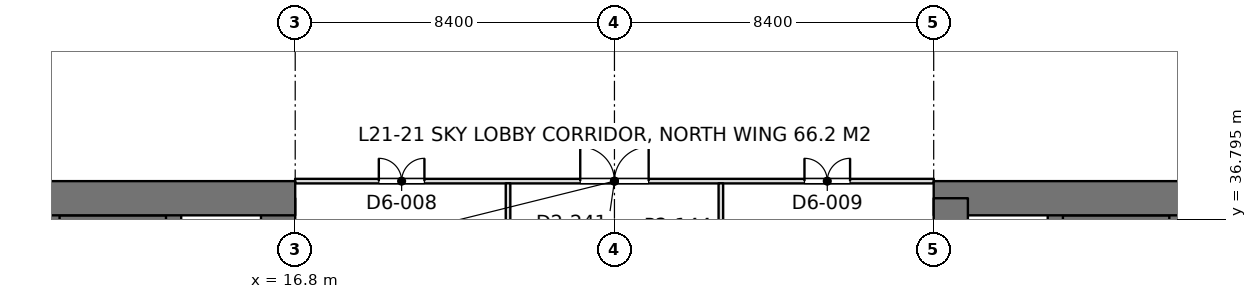
"""IFC4 building model, lengths in metres.
Left out: names, types, materials, properties, quantities, classifications, styles, units other than length and angle.
Written with IfcOpenShell. Run it as: python <this file> out.ifc"""

import sys

from ifc_helpers import new_model, si_unit, direction, frame, frame_2d, origin, place, context, subcontext, project, spatial, rectangle, extrude, element, fill, save


model = new_model("IFC4")
c1 = context("Model", 3, precision=1e-05, world=origin(), true_north=direction((0.0, 1.0)))
c2 = subcontext(c1, "Body", "Model", "MODEL_VIEW")
j1 = project(units=[si_unit("LENGTHUNIT", "METRE"), si_unit("PLANEANGLEUNIT", "RADIAN")], contexts=[c1])
p1 = place(None, origin())
s1 = spatial("IfcSite", under=j1, at=p1, CompositionType="ELEMENT")
p2 = place(p1, origin())
s2 = spatial("IfcBuilding", under=s1, at=p2, CompositionType="ELEMENT")
p3 = place(p2, frame((0.0, 0.0, 96.3)))
s3 = spatial("IfcBuildingStorey", under=s2, at=p3, CompositionType="ELEMENT", Elevation=96.3)
p4 = place(p3, frame((-1.2, 37.35, 0.0), z_axis=(0.0, 0.0, 1.0), x_axis=(1.0, 0.0, 0.0)))
e1 = element("IfcWall", 1, at=p4, inside=s3, PredefinedType="SHEAR", context=c2, shape_type="SweptSolid", body=[
    extrude(rectangle(XDim=18.0, YDim=0.9, at=frame_2d((9.0, 0.0))), origin(), (0.0, 0.0, 1.0), 4.5),
])
p5 = place(p4, frame((8.95, 0.0, 0.0)))
e2 = element("IfcOpeningElement", 2, at=p5, cuts=e1, PredefinedType="OPENING", context=c2, shape_type="SweptSolid", body=[
    extrude(rectangle(XDim=1.8, YDim=2.4, at=frame_2d((0.9, 1.2))), frame((0.0, 0.46, 0.0), z_axis=(0.0, -1.0, 0.0), x_axis=(1.0, 0.0, 0.0)), (0.0, 0.0, 1.0), 0.92),
])
p6 = place(p3, frame((16.35, 22.1, 0.0), z_axis=(0.0, 0.0, 1.0), x_axis=(0.0, 1.0, 0.0)))
e3 = element("IfcWall", 3, at=p6, inside=s3, PredefinedType="SHEAR", context=c2, shape_type="SweptSolid", body=[
    extrude(rectangle(XDim=15.25, YDim=0.9, at=frame_2d((7.625, 0.0))), origin(), (0.0, 0.0, 1.0), 4.5),
])
p7 = place(p3, frame((10.4, 13.05, 0.0), z_axis=(0.0, 0.0, 1.0), x_axis=(0.0, 1.0, 0.0)))
e4 = element("IfcWall", 4, at=p7, inside=s3, PredefinedType="SHEAR", context=c2, shape_type="SweptSolid", body=[
    extrude(rectangle(XDim=24.3, YDim=0.4, at=frame_2d((12.15, 0.0))), origin(), (0.0, 0.0, 1.0), 4.5),
])
p8 = place(p7, frame((10.05, 0.0, 0.0)))
e5 = element("IfcOpeningElement", 5, at=p8, cuts=e4, PredefinedType="OPENING", context=c2, shape_type="SweptSolid", body=[
    extrude(rectangle(XDim=1.1, YDim=2.2, at=frame_2d((0.55, 1.1))), frame((0.0, 0.21, 0.0), z_axis=(0.0, -1.0, 0.0), x_axis=(1.0, 0.0, 0.0)), (0.0, 0.0, 1.0), 0.42),
])
p9 = place(p7, frame((12.9, 0.0, 0.0)))
e6 = element("IfcOpeningElement", 6, at=p9, cuts=e4, PredefinedType="OPENING", context=c2, shape_type="SweptSolid", body=[
    extrude(rectangle(XDim=1.1, YDim=2.2, at=frame_2d((0.55, 1.1))), frame((0.0, 0.21, 0.0), z_axis=(0.0, -1.0, 0.0), x_axis=(1.0, 0.0, 0.0)), (0.0, 0.0, 1.0), 0.42),
])
p10 = place(p7, frame((21.45, 0.0, 0.0)))
e7 = element("IfcOpeningElement", 7, at=p10, cuts=e4, PredefinedType="OPENING", context=c2, shape_type="SweptSolid", body=[
    extrude(rectangle(XDim=1.1, YDim=2.2, at=frame_2d((0.55, 1.1))), frame((0.0, 0.21, 0.0), z_axis=(0.0, -1.0, 0.0), x_axis=(1.0, 0.0, 0.0)), (0.0, 0.0, 1.0), 0.42),
])
p11 = place(p7, frame((6.1, 0.0, 0.0)))
e8 = element("IfcOpeningElement", 8, at=p11, cuts=e4, PredefinedType="OPENING", context=c2, shape_type="SweptSolid", body=[
    extrude(rectangle(XDim=1.8, YDim=2.4, at=frame_2d((0.9, 1.2))), frame((0.0, 0.21, 0.0), z_axis=(0.0, -1.0, 0.0), x_axis=(1.0, 0.0, 0.0)), (0.0, 0.0, 1.0), 0.42),
])
p12 = place(p3, frame((13.6, 22.225, 0.0), z_axis=(0.0, 0.0, 1.0), x_axis=(0.0, 1.0, 0.0)))
e9 = element("IfcWall", 9, at=p12, inside=s3, PredefinedType="SHEAR", context=c2, shape_type="SweptSolid", body=[
    extrude(rectangle(XDim=15.125, YDim=0.4, at=frame_2d((7.562, 0.0))), origin(), (0.0, 0.0, 1.0), 4.5),
])
p13 = place(p3, frame((10.4, 36.625, 0.0), z_axis=(0.0, 0.0, 1.0), x_axis=(1.0, 0.0, 0.0)))
e10 = element("IfcWall", 10, at=p13, inside=s3, PredefinedType="SHEAR", context=c2, shape_type="SweptSolid", body=[
    extrude(rectangle(XDim=3.2, YDim=0.55, at=frame_2d((1.6, 0.0))), origin(), (0.0, 0.0, 1.0), 4.5),
])
p14 = place(p3, frame((33.6, 37.35, 0.0), z_axis=(0.0, 0.0, 1.0), x_axis=(1.0, 0.0, 0.0)))
e11 = element("IfcWall", 11, at=p14, inside=s3, PredefinedType="SHEAR", context=c2, shape_type="SweptSolid", body=[
    extrude(rectangle(XDim=18.0, YDim=0.9, at=frame_2d((9.0, 0.0))), origin(), (0.0, 0.0, 1.0), 4.5),
])
p15 = place(p14, frame((7.25, 0.0, 0.0)))
e12 = element("IfcOpeningElement", 12, at=p15, cuts=e11, PredefinedType="OPENING", context=c2, shape_type="SweptSolid", body=[
    extrude(rectangle(XDim=1.8, YDim=2.4, at=frame_2d((0.9, 1.2))), frame((0.0, 0.46, 0.0), z_axis=(0.0, -1.0, 0.0), x_axis=(1.0, 0.0, 0.0)), (0.0, 0.0, 1.0), 0.92),
])
p16 = place(p3, frame((34.05, 22.1, 0.0), z_axis=(0.0, 0.0, 1.0), x_axis=(0.0, 1.0, 0.0)))
e13 = element("IfcWall", 13, at=p16, inside=s3, PredefinedType="SHEAR", context=c2, shape_type="SweptSolid", body=[
    extrude(rectangle(XDim=15.25, YDim=0.9, at=frame_2d((7.625, 0.0))), origin(), (0.0, 0.0, 1.0), 4.5),
])
p17 = place(p3, frame((40.0, 13.05, 0.0), z_axis=(0.0, 0.0, 1.0), x_axis=(0.0, 1.0, 0.0)))
e14 = element("IfcWall", 14, at=p17, inside=s3, PredefinedType="SHEAR", context=c2, shape_type="SweptSolid", body=[
    extrude(rectangle(XDim=24.3, YDim=0.4, at=frame_2d((12.15, 0.0))), origin(), (0.0, 0.0, 1.0), 4.5),
])
p18 = place(p17, frame((10.05, 0.0, 0.0)))
e15 = element("IfcOpeningElement", 15, at=p18, cuts=e14, PredefinedType="OPENING", context=c2, shape_type="SweptSolid", body=[
    extrude(rectangle(XDim=1.1, YDim=2.2, at=frame_2d((0.55, 1.1))), frame((0.0, 0.21, 0.0), z_axis=(0.0, -1.0, 0.0), x_axis=(1.0, 0.0, 0.0)), (0.0, 0.0, 1.0), 0.42),
])
p19 = place(p17, frame((12.9, 0.0, 0.0)))
e16 = element("IfcOpeningElement", 16, at=p19, cuts=e14, PredefinedType="OPENING", context=c2, shape_type="SweptSolid", body=[
    extrude(rectangle(XDim=1.1, YDim=2.2, at=frame_2d((0.55, 1.1))), frame((0.0, 0.21, 0.0), z_axis=(0.0, -1.0, 0.0), x_axis=(1.0, 0.0, 0.0)), (0.0, 0.0, 1.0), 0.42),
])
p20 = place(p17, frame((21.45, 0.0, 0.0)))
e17 = element("IfcOpeningElement", 17, at=p20, cuts=e14, PredefinedType="OPENING", context=c2, shape_type="SweptSolid", body=[
    extrude(rectangle(XDim=1.1, YDim=2.2, at=frame_2d((0.55, 1.1))), frame((0.0, 0.21, 0.0), z_axis=(0.0, -1.0, 0.0), x_axis=(1.0, 0.0, 0.0)), (0.0, 0.0, 1.0), 0.42),
])
p21 = place(p17, frame((5.8, 0.0, 0.0)))
e18 = element("IfcOpeningElement", 18, at=p21, cuts=e14, PredefinedType="OPENING", context=c2, shape_type="SweptSolid", body=[
    extrude(rectangle(XDim=1.8, YDim=2.4, at=frame_2d((0.9, 1.2))), frame((0.0, 0.21, 0.0), z_axis=(0.0, -1.0, 0.0), x_axis=(1.0, 0.0, 0.0)), (0.0, 0.0, 1.0), 0.42),
])
p22 = place(p3, frame((36.8, 22.225, 0.0), z_axis=(0.0, 0.0, 1.0), x_axis=(0.0, 1.0, 0.0)))
e19 = element("IfcWall", 19, at=p22, inside=s3, PredefinedType="SHEAR", context=c2, shape_type="SweptSolid", body=[
    extrude(rectangle(XDim=15.125, YDim=0.4, at=frame_2d((7.562, 0.0))), origin(), (0.0, 0.0, 1.0), 4.5),
])
p23 = place(p3, frame((40.0, 36.625, 0.0), z_axis=(0.0, 0.0, 1.0), x_axis=(-1.0, 0.0, 0.0)))
e20 = element("IfcWall", 20, at=p23, inside=s3, PredefinedType="SHEAR", context=c2, shape_type="SweptSolid", body=[
    extrude(rectangle(XDim=3.2, YDim=0.55, at=frame_2d((1.6, 0.0))), origin(), (0.0, 0.0, 1.0), 4.5),
])
p24 = place(p3, frame((16.798, 37.8, 0.0), z_axis=(0.0, 0.0, 1.0), x_axis=(1.0, 0.0, 0.0)))
e21 = element("IfcWall", 21, at=p24, inside=s3, PredefinedType="PARTITIONING", context=c2, shape_type="SweptSolid", body=[
    extrude(rectangle(XDim=16.804, YDim=0.12, at=frame_2d((8.402, 0.0))), origin(), (0.0, 0.0, 1.0), 3.85),
])
p25 = place(p24, frame((2.202, 0.0, 0.0)))
e22 = element("IfcOpeningElement", 22, at=p25, cuts=e21, PredefinedType="OPENING", context=c2, shape_type="SweptSolid", body=[
    extrude(rectangle(XDim=1.2, YDim=2.2, at=frame_2d((0.6, 1.1))), frame((0.0, 0.07, 0.0), z_axis=(0.0, -1.0, 0.0), x_axis=(1.0, 0.0, 0.0)), (0.0, 0.0, 1.0), 0.14),
])
p26 = place(p24, frame((7.502, 0.0, 0.0)))
e23 = element("IfcOpeningElement", 23, at=p26, cuts=e21, PredefinedType="OPENING", context=c2, shape_type="SweptSolid", body=[
    extrude(rectangle(XDim=1.8, YDim=2.2, at=frame_2d((0.9, 1.1))), frame((0.0, 0.07, 0.0), z_axis=(0.0, -1.0, 0.0), x_axis=(1.0, 0.0, 0.0)), (0.0, 0.0, 1.0), 0.14),
])
p27 = place(p24, frame((13.402, 0.0, 0.0)))
e24 = element("IfcOpeningElement", 24, at=p27, cuts=e21, PredefinedType="OPENING", context=c2, shape_type="SweptSolid", body=[
    extrude(rectangle(XDim=1.2, YDim=2.2, at=frame_2d((0.6, 1.1))), frame((0.0, 0.07, 0.0), z_axis=(0.0, -1.0, 0.0), x_axis=(1.0, 0.0, 0.0)), (0.0, 0.0, 1.0), 0.14),
])
for number, where, z_axis, x_axis in (
    (25, (22.4, 33.208, 0.0), (0.0, 0.0, 1.0), (0.0, 1.0, 0.0)),
    (26, (28.0, 33.208, 0.0), (0.0, 0.0, 1.0), (0.0, 1.0, 0.0)),
):
    element("IfcWall", number, at=place(p3, frame(where, z_axis=z_axis, x_axis=x_axis)), inside=s3, PredefinedType="PARTITIONING", context=c2, shape_type="SweptSolid", body=[
        extrude(rectangle(XDim=4.534, YDim=0.12, at=frame_2d((2.267, 0.0))), origin(), (0.0, 0.0, 1.0), 3.5),
    ])
p28 = place(p25, origin())
e27 = element("IfcDoor", 27, at=p28, inside=s3, OperationType="DOUBLE_DOOR_SINGLE_SWING_OPPOSITE_LEFT", PredefinedType="DOOR", context=c2, shape_type="SweptSolid", body=[
    extrude(rectangle(XDim=1.2, YDim=2.2, at=frame_2d((0.6, 1.1))), frame((0.0, 0.025, 0.0), z_axis=(0.0, -1.0, 0.0), x_axis=(1.0, 0.0, 0.0)), (0.0, 0.0, 1.0), 0.05),
])
fill(e22, e27)
p29 = place(p26, origin())
e28 = element("IfcDoor", 28, at=p29, inside=s3, OperationType="DOUBLE_DOOR_SINGLE_SWING", PredefinedType="DOOR", context=c2, shape_type="SweptSolid", body=[
    extrude(rectangle(XDim=1.8, YDim=2.2, at=frame_2d((0.9, 1.1))), frame((0.0, 0.025, 0.0), z_axis=(0.0, -1.0, 0.0), x_axis=(1.0, 0.0, 0.0)), (0.0, 0.0, 1.0), 0.05),
])
fill(e23, e28)
p30 = place(p27, origin())
e29 = element("IfcDoor", 29, at=p30, inside=s3, OperationType="DOUBLE_DOOR_SINGLE_SWING_OPPOSITE_LEFT", PredefinedType="DOOR", context=c2, shape_type="SweptSolid", body=[
    extrude(rectangle(XDim=1.2, YDim=2.2, at=frame_2d((0.6, 1.1))), frame((0.0, 0.025, 0.0), z_axis=(0.0, -1.0, 0.0), x_axis=(1.0, 0.0, 0.0)), (0.0, 0.0, 1.0), 0.05),
])
fill(e24, e29)
save(model, sys.argv[1])
